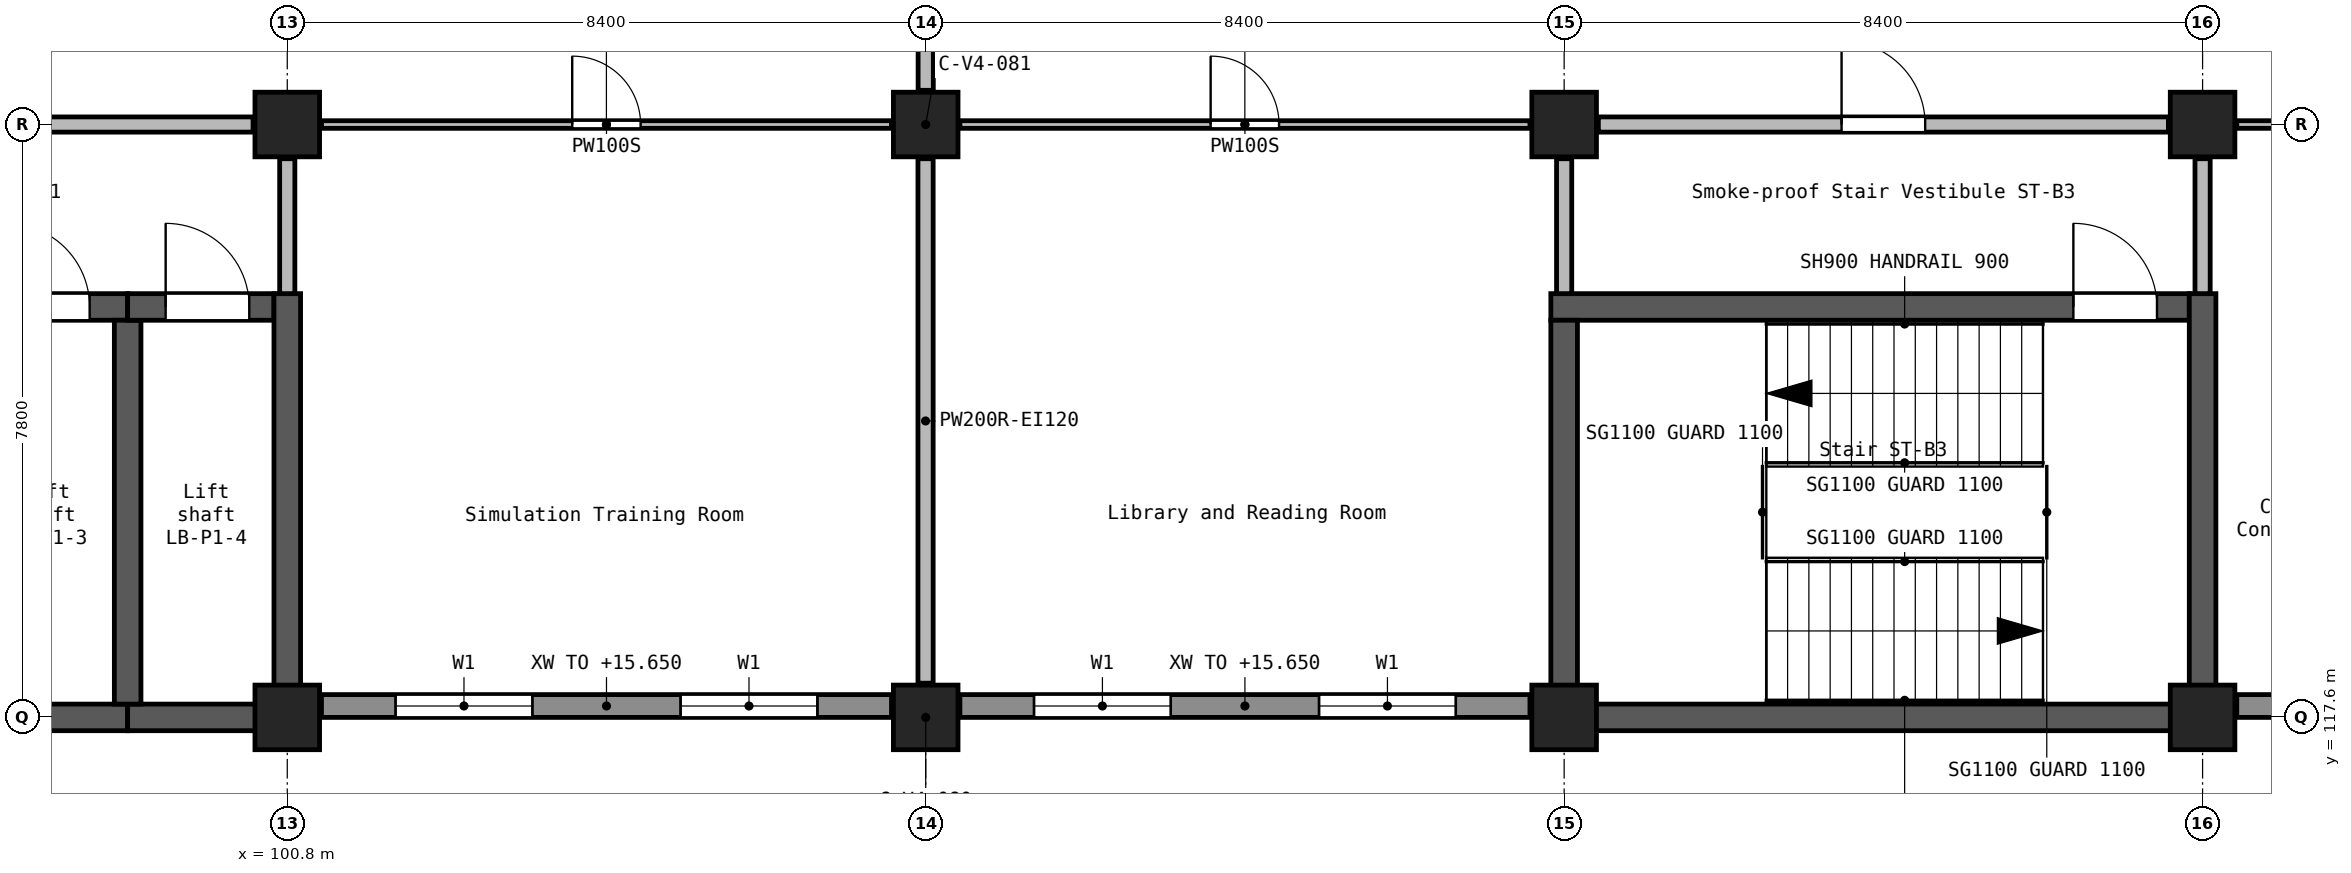
"""IFC4 building model, lengths in metres.
Left out: names, types, materials, properties, quantities, classifications, styles, units other than length and angle.
Written with IfcOpenShell. Run it as: python <this file> out.ifc"""

import sys

from ifc_helpers import new_model, si_unit, direction, frame, frame_2d, origin, origin_2d, place, context, subcontext, project, spatial, rectangle, extrude, element, fill, save


model = new_model("IFC4")
c1 = context("Model", 3, precision=1e-05, world=origin(), true_north=direction((0.0, 1.0)))
c2 = subcontext(c1, "Body", "Model", "MODEL_VIEW")
j1 = project(units=[si_unit("LENGTHUNIT", "METRE"), si_unit("PLANEANGLEUNIT", "RADIAN")], contexts=[c1])
p1 = place(None, origin())
s1 = spatial("IfcSite", under=j1, at=p1, CompositionType="ELEMENT")
p2 = place(p1, origin())
s2 = spatial("IfcBuilding", under=s1, at=p2, CompositionType="ELEMENT")
p3 = place(p2, frame((0.0, 0.0, 12.6)))
s3 = spatial("IfcBuildingStorey", under=s2, at=p3, CompositionType="ELEMENT", Elevation=12.6)
for number, where, z_axis, x_axis in (
    (1, (100.8, 117.6, 0.0), (0.0, 0.0, 1.0), (1.0, 0.0, 0.0)),
    (2, (100.8, 125.4, 0.0), (0.0, 0.0, 1.0), (1.0, 0.0, 0.0)),
    (3, (109.2, 117.6, 0.0), (0.0, 0.0, 1.0), (1.0, 0.0, 0.0)),
    (4, (109.2, 125.4, 0.0), (0.0, 0.0, 1.0), (1.0, 0.0, 0.0)),
    (5, (117.6, 117.6, 0.0), (0.0, 0.0, 1.0), (1.0, 0.0, 0.0)),
    (6, (117.6, 125.4, 0.0), (0.0, 0.0, 1.0), (1.0, 0.0, 0.0)),
    (7, (126.0, 117.6, 0.0), (0.0, 0.0, 1.0), (1.0, 0.0, 0.0)),
    (8, (126.0, 125.4, 0.0), (0.0, 0.0, 1.0), (1.0, 0.0, 0.0)),
):
    element("IfcColumn", number, at=place(p3, frame(where, z_axis=z_axis, x_axis=x_axis)), inside=s3, PredefinedType="COLUMN", context=c2, shape_type="SweptSolid", body=[
        extrude(rectangle(XDim=0.85, YDim=0.85, at=origin_2d()), origin(), (0.0, 0.0, 1.0), 4.2),
    ])
p4 = place(p3, frame((96.6, 117.6, 0.0), z_axis=(0.0, 0.0, 1.0), x_axis=(1.0, 0.0, 0.0)))
e9 = element("IfcWall", 9, at=p4, inside=s3, PredefinedType="SHEAR", context=c2, shape_type="SweptSolid", body=[
    extrude(rectangle(XDim=2.1, YDim=0.35, at=frame_2d((1.05, 0.0))), origin(), (0.0, 0.0, 1.0), 4.2),
])
p5 = place(p3, frame((96.6, 123.0, 0.0), z_axis=(0.0, 0.0, 1.0), x_axis=(1.0, 0.0, 0.0)))
e10 = element("IfcWall", 10, at=p5, inside=s3, PredefinedType="SHEAR", context=c2, shape_type="SweptSolid", body=[
    extrude(rectangle(XDim=2.1, YDim=0.35, at=frame_2d((1.05, 0.0))), origin(), (0.0, 0.0, 1.0), 4.2),
])
p6 = place(p5, frame((0.5, 0.0, 0.0)))
e11 = element("IfcOpeningElement", 11, at=p6, cuts=e10, PredefinedType="OPENING", context=c2, shape_type="SweptSolid", body=[
    extrude(rectangle(XDim=1.1, YDim=2.1, at=frame_2d((0.55, 1.05))), frame((0.0, 0.185, 0.0), z_axis=(0.0, -1.0, 0.0), x_axis=(1.0, 0.0, 0.0)), (0.0, 0.0, 1.0), 0.37),
])
p7 = place(p3, frame((98.7, 117.6, 0.0), z_axis=(0.0, 0.0, 1.0), x_axis=(1.0, 0.0, 0.0)))
e12 = element("IfcWall", 12, at=p7, inside=s3, PredefinedType="SHEAR", context=c2, shape_type="SweptSolid", body=[
    extrude(rectangle(XDim=1.925, YDim=0.35, at=frame_2d((0.962, 0.0))), origin(), (0.0, 0.0, 1.0), 4.2),
])
p8 = place(p3, frame((98.7, 117.775, 0.0), z_axis=(0.0, 0.0, 1.0), x_axis=(0.0, 1.0, 0.0)))
e13 = element("IfcWall", 13, at=p8, inside=s3, PredefinedType="SHEAR", context=c2, shape_type="SweptSolid", body=[
    extrude(rectangle(XDim=5.05, YDim=0.35, at=frame_2d((2.525, 0.0))), origin(), (0.0, 0.0, 1.0), 4.2),
])
p9 = place(p3, frame((98.7, 123.0, 0.0), z_axis=(0.0, 0.0, 1.0), x_axis=(1.0, 0.0, 0.0)))
e14 = element("IfcWall", 14, at=p9, inside=s3, PredefinedType="SHEAR", context=c2, shape_type="SweptSolid", body=[
    extrude(rectangle(XDim=1.925, YDim=0.35, at=frame_2d((0.962, 0.0))), origin(), (0.0, 0.0, 1.0), 4.2),
])
p10 = place(p9, frame((0.5, 0.0, 0.0)))
e15 = element("IfcOpeningElement", 15, at=p10, cuts=e14, PredefinedType="OPENING", context=c2, shape_type="SweptSolid", body=[
    extrude(rectangle(XDim=1.1, YDim=2.1, at=frame_2d((0.55, 1.05))), frame((0.0, 0.185, 0.0), z_axis=(0.0, -1.0, 0.0), x_axis=(1.0, 0.0, 0.0)), (0.0, 0.0, 1.0), 0.37),
])
p11 = place(p3, frame((100.8, 117.425, 0.0), z_axis=(0.0, 0.0, 1.0), x_axis=(0.0, 1.0, 0.0)))
e16 = element("IfcWall", 16, at=p11, inside=s3, PredefinedType="SHEAR", context=c2, shape_type="SweptSolid", body=[
    extrude(rectangle(XDim=5.75, YDim=0.35, at=frame_2d((2.875, 0.0))), origin(), (0.0, 0.0, 1.0), 4.2),
])
p12 = place(p3, frame((117.425, 123.0, 0.0), z_axis=(0.0, 0.0, 1.0), x_axis=(1.0, 0.0, 0.0)))
e17 = element("IfcWall", 17, at=p12, inside=s3, PredefinedType="SHEAR", context=c2, shape_type="SweptSolid", body=[
    extrude(rectangle(XDim=8.4, YDim=0.35, at=frame_2d((4.2, 0.0))), origin(), (0.0, 0.0, 1.0), 4.2),
])
p13 = place(p12, frame((6.875, 0.0, 0.0)))
e18 = element("IfcOpeningElement", 18, at=p13, cuts=e17, PredefinedType="OPENING", context=c2, shape_type="SweptSolid", body=[
    extrude(rectangle(XDim=1.1, YDim=2.1, at=frame_2d((0.55, 1.05))), frame((0.0, 0.185, 0.0), z_axis=(0.0, -1.0, 0.0), x_axis=(1.0, 0.0, 0.0)), (0.0, 0.0, 1.0), 0.37),
])
p14 = place(p3, frame((117.6, 117.425, 0.0), z_axis=(0.0, 0.0, 1.0), x_axis=(0.0, 1.0, 0.0)))
e19 = element("IfcWall", 19, at=p14, inside=s3, PredefinedType="SHEAR", context=c2, shape_type="SweptSolid", body=[
    extrude(rectangle(XDim=5.4, YDim=0.35, at=frame_2d((2.7, 0.0))), origin(), (0.0, 0.0, 1.0), 4.2),
])
p15 = place(p3, frame((117.775, 117.6, 0.0), z_axis=(0.0, 0.0, 1.0), x_axis=(1.0, 0.0, 0.0)))
e20 = element("IfcWall", 20, at=p15, inside=s3, PredefinedType="SHEAR", context=c2, shape_type="SweptSolid", body=[
    extrude(rectangle(XDim=8.05, YDim=0.35, at=frame_2d((4.025, 0.0))), origin(), (0.0, 0.0, 1.0), 4.2),
])
p16 = place(p3, frame((126.0, 117.425, 0.0), z_axis=(0.0, 0.0, 1.0), x_axis=(0.0, 1.0, 0.0)))
e21 = element("IfcWall", 21, at=p16, inside=s3, PredefinedType="SHEAR", context=c2, shape_type="SweptSolid", body=[
    extrude(rectangle(XDim=5.75, YDim=0.35, at=frame_2d((2.875, 0.0))), origin(), (0.0, 0.0, 1.0), 4.2),
])
p17 = place(p3, frame((101.25, 117.75, 0.0), z_axis=(0.0, 0.0, 1.0), x_axis=(1.0, 0.0, 0.0)))
e22 = element("IfcWall", 22, at=p17, inside=s3, PredefinedType="STANDARD", context=c2, shape_type="SweptSolid", body=[
    extrude(rectangle(XDim=7.5, YDim=0.3, at=frame_2d((3.75, 0.0))), origin(), (0.0, 0.0, 1.0), 3.05),
])
p18 = place(p17, frame((0.975, 0.0, 0.9)))
e23 = element("IfcOpeningElement", 23, at=p18, cuts=e22, PredefinedType="OPENING", context=c2, shape_type="SweptSolid", body=[
    extrude(rectangle(XDim=1.8, YDim=1.5, at=frame_2d((0.9, 0.75))), frame((0.0, 0.16, 0.0), z_axis=(0.0, -1.0, 0.0), x_axis=(1.0, 0.0, 0.0)), (0.0, 0.0, 1.0), 0.32),
])
p19 = place(p17, frame((4.725, 0.0, 0.9)))
e24 = element("IfcOpeningElement", 24, at=p19, cuts=e22, PredefinedType="OPENING", context=c2, shape_type="SweptSolid", body=[
    extrude(rectangle(XDim=1.8, YDim=1.5, at=frame_2d((0.9, 0.75))), frame((0.0, 0.16, 0.0), z_axis=(0.0, -1.0, 0.0), x_axis=(1.0, 0.0, 0.0)), (0.0, 0.0, 1.0), 0.32),
])
p20 = place(p3, frame((109.65, 117.75, 0.0), z_axis=(0.0, 0.0, 1.0), x_axis=(1.0, 0.0, 0.0)))
e25 = element("IfcWall", 25, at=p20, inside=s3, PredefinedType="STANDARD", context=c2, shape_type="SweptSolid", body=[
    extrude(rectangle(XDim=7.5, YDim=0.3, at=frame_2d((3.75, 0.0))), origin(), (0.0, 0.0, 1.0), 3.05),
])
p21 = place(p20, frame((0.975, 0.0, 0.9)))
e26 = element("IfcOpeningElement", 26, at=p21, cuts=e25, PredefinedType="OPENING", context=c2, shape_type="SweptSolid", body=[
    extrude(rectangle(XDim=1.8, YDim=1.5, at=frame_2d((0.9, 0.75))), frame((0.0, 0.16, 0.0), z_axis=(0.0, -1.0, 0.0), x_axis=(1.0, 0.0, 0.0)), (0.0, 0.0, 1.0), 0.32),
])
p22 = place(p20, frame((4.725, 0.0, 0.9)))
e27 = element("IfcOpeningElement", 27, at=p22, cuts=e25, PredefinedType="OPENING", context=c2, shape_type="SweptSolid", body=[
    extrude(rectangle(XDim=1.8, YDim=1.5, at=frame_2d((0.9, 0.75))), frame((0.0, 0.16, 0.0), z_axis=(0.0, -1.0, 0.0), x_axis=(1.0, 0.0, 0.0)), (0.0, 0.0, 1.0), 0.32),
])
p23 = place(p3, frame((126.45, 117.75, 0.0), z_axis=(0.0, 0.0, 1.0), x_axis=(1.0, 0.0, 0.0)))
e28 = element("IfcWall", 28, at=p23, inside=s3, PredefinedType="STANDARD", context=c2, shape_type="SweptSolid", body=[
    extrude(rectangle(XDim=7.5, YDim=0.3, at=frame_2d((3.75, 0.0))), origin(), (0.0, 0.0, 1.0), 3.05),
])
p24 = place(p23, frame((0.975, 0.0, 0.9)))
e29 = element("IfcOpeningElement", 29, at=p24, cuts=e28, PredefinedType="OPENING", context=c2, shape_type="SweptSolid", body=[
    extrude(rectangle(XDim=1.8, YDim=1.5, at=frame_2d((0.9, 0.75))), frame((0.0, 0.16, 0.0), z_axis=(0.0, -1.0, 0.0), x_axis=(1.0, 0.0, 0.0)), (0.0, 0.0, 1.0), 0.32),
])
p25 = place(p23, frame((4.725, 0.0, 0.9)))
e30 = element("IfcOpeningElement", 30, at=p25, cuts=e28, PredefinedType="OPENING", context=c2, shape_type="SweptSolid", body=[
    extrude(rectangle(XDim=1.8, YDim=1.5, at=frame_2d((0.9, 0.75))), frame((0.0, 0.16, 0.0), z_axis=(0.0, -1.0, 0.0), x_axis=(1.0, 0.0, 0.0)), (0.0, 0.0, 1.0), 0.32),
])
p26 = place(p3, frame((118.05, 125.4, 0.0), z_axis=(0.0, 0.0, 1.0), x_axis=(1.0, 0.0, 0.0)))
e31 = element("IfcWall", 31, at=p26, inside=s3, PredefinedType="SOLIDWALL", context=c2, shape_type="SweptSolid", body=[
    extrude(rectangle(XDim=7.5, YDim=0.2, at=frame_2d((3.75, 0.0))), origin(), (0.0, 0.0, 1.0), 3.85),
])
p27 = place(p26, frame((3.2, 0.0, 0.0)))
e32 = element("IfcOpeningElement", 32, at=p27, cuts=e31, PredefinedType="OPENING", context=c2, shape_type="SweptSolid", body=[
    extrude(rectangle(XDim=1.1, YDim=2.1, at=frame_2d((0.55, 1.05))), frame((0.0, 0.11, 0.0), z_axis=(0.0, -1.0, 0.0), x_axis=(1.0, 0.0, 0.0)), (0.0, 0.0, 1.0), 0.22),
])
p28 = place(p3, frame((92.85, 125.4, 0.0), z_axis=(0.0, 0.0, 1.0), x_axis=(1.0, 0.0, 0.0)))
e33 = element("IfcWall", 33, at=p28, inside=s3, PredefinedType="SOLIDWALL", context=c2, shape_type="SweptSolid", body=[
    extrude(rectangle(XDim=7.5, YDim=0.2, at=frame_2d((3.75, 0.0))), origin(), (0.0, 0.0, 1.0), 3.85),
])
p29 = place(p28, frame((2.85, 0.0, 0.0)))
e34 = element("IfcOpeningElement", 34, at=p29, cuts=e33, PredefinedType="OPENING", context=c2, shape_type="SweptSolid", body=[
    extrude(rectangle(XDim=1.8, YDim=2.1, at=frame_2d((0.9, 1.05))), frame((0.0, 0.11, 0.0), z_axis=(0.0, -1.0, 0.0), x_axis=(1.0, 0.0, 0.0)), (0.0, 0.0, 1.0), 0.22),
])
p30 = place(p3, frame((109.198, 118.05, 0.0), z_axis=(0.0, 0.0, 1.0), x_axis=(0.0, 1.0, 0.0)))
e35 = element("IfcWall", 35, at=p30, inside=s3, PredefinedType="SOLIDWALL", context=c2, shape_type="SweptSolid", body=[
    extrude(rectangle(XDim=6.9, YDim=0.2, at=frame_2d((3.45, 0.0))), origin(), (0.0, 0.0, 1.0), 3.85),
])
p31 = place(p3, frame((109.2, 125.85, 0.0), z_axis=(0.0, 0.0, 1.0), x_axis=(0.0, 1.0, 0.0)))
e36 = element("IfcWall", 36, at=p31, inside=s3, PredefinedType="SOLIDWALL", context=c2, shape_type="SweptSolid", body=[
    extrude(rectangle(XDim=2.7, YDim=0.2, at=frame_2d((1.35, 0.0))), origin(), (0.0, 0.0, 1.0), 3.85),
])
for number, where, z_axis, x_axis in (
    (37, (100.8, 123.175, 0.0), (0.0, 0.0, 1.0), (0.0, 1.0, 0.0)),
    (38, (117.6, 123.175, 0.0), (0.0, 0.0, 1.0), (0.0, 1.0, 0.0)),
    (39, (126.0, 123.175, 0.0), (0.0, 0.0, 1.0), (0.0, 1.0, 0.0)),
):
    element("IfcWall", number, at=place(p3, frame(where, z_axis=z_axis, x_axis=x_axis)), inside=s3, PredefinedType="SOLIDWALL", context=c2, shape_type="SweptSolid", body=[
        extrude(rectangle(XDim=1.775, YDim=0.2, at=frame_2d((0.887, 0.0))), origin(), (0.0, 0.0, 1.0), 3.85),
    ])
p32 = place(p3, frame((109.65, 125.4, 0.0), z_axis=(0.0, 0.0, 1.0), x_axis=(1.0, 0.0, 0.0)))
e40 = element("IfcWall", 40, at=p32, inside=s3, PredefinedType="PARTITIONING", context=c2, shape_type="SweptSolid", body=[
    extrude(rectangle(XDim=7.5, YDim=0.1, at=frame_2d((3.75, 0.0))), origin(), (0.0, 0.0, 1.0), 3.85),
])
p33 = place(p32, frame((3.299, 0.0, 0.0)))
e41 = element("IfcOpeningElement", 41, at=p33, cuts=e40, PredefinedType="OPENING", context=c2, shape_type="SweptSolid", body=[
    extrude(rectangle(XDim=0.9, YDim=2.1, at=frame_2d((0.45, 1.05))), frame((0.0, 0.06, 0.0), z_axis=(0.0, -1.0, 0.0), x_axis=(1.0, 0.0, 0.0)), (0.0, 0.0, 1.0), 0.12),
])
p34 = place(p3, frame((101.25, 125.4, 0.0), z_axis=(0.0, 0.0, 1.0), x_axis=(1.0, 0.0, 0.0)))
e42 = element("IfcWall", 42, at=p34, inside=s3, PredefinedType="PARTITIONING", context=c2, shape_type="SweptSolid", body=[
    extrude(rectangle(XDim=7.5, YDim=0.1, at=frame_2d((3.75, 0.0))), origin(), (0.0, 0.0, 1.0), 3.85),
])
p35 = place(p34, frame((3.299, 0.0, 0.0)))
e43 = element("IfcOpeningElement", 43, at=p35, cuts=e42, PredefinedType="OPENING", context=c2, shape_type="SweptSolid", body=[
    extrude(rectangle(XDim=0.9, YDim=2.1, at=frame_2d((0.45, 1.05))), frame((0.0, 0.06, 0.0), z_axis=(0.0, -1.0, 0.0), x_axis=(1.0, 0.0, 0.0)), (0.0, 0.0, 1.0), 0.12),
])
p36 = place(p3, frame((126.45, 125.4, 0.0), z_axis=(0.0, 0.0, 1.0), x_axis=(1.0, 0.0, 0.0)))
e44 = element("IfcWall", 44, at=p36, inside=s3, PredefinedType="PARTITIONING", context=c2, shape_type="SweptSolid", body=[
    extrude(rectangle(XDim=3.05, YDim=0.1, at=frame_2d((1.525, 0.0))), origin(), (0.0, 0.0, 1.0), 3.85),
])
p37 = place(p36, frame((0.9, 0.0, 0.0)))
e45 = element("IfcOpeningElement", 45, at=p37, cuts=e44, PredefinedType="OPENING", context=c2, shape_type="SweptSolid", body=[
    extrude(rectangle(XDim=0.9, YDim=2.1, at=frame_2d((0.45, 1.05))), frame((0.0, 0.06, 0.0), z_axis=(0.0, -1.0, 0.0), x_axis=(1.0, 0.0, 0.0)), (0.0, 0.0, 1.0), 0.12),
])
p38 = place(p18, origin())
e46 = element("IfcWindow", 46, at=p38, inside=s3, PartitioningType="SINGLE_PANEL", PredefinedType="WINDOW", context=c2, shape_type="SweptSolid", body=[
    extrude(rectangle(XDim=1.8, YDim=1.5, at=frame_2d((0.9, 0.75))), frame((0.0, 0.03, 0.0), z_axis=(0.0, -1.0, 0.0), x_axis=(1.0, 0.0, 0.0)), (0.0, 0.0, 1.0), 0.06),
])
fill(e23, e46)
p39 = place(p19, origin())
e47 = element("IfcWindow", 47, at=p39, inside=s3, PartitioningType="SINGLE_PANEL", PredefinedType="WINDOW", context=c2, shape_type="SweptSolid", body=[
    extrude(rectangle(XDim=1.8, YDim=1.5, at=frame_2d((0.9, 0.75))), frame((0.0, 0.03, 0.0), z_axis=(0.0, -1.0, 0.0), x_axis=(1.0, 0.0, 0.0)), (0.0, 0.0, 1.0), 0.06),
])
fill(e24, e47)
p40 = place(p21, origin())
e48 = element("IfcWindow", 48, at=p40, inside=s3, PartitioningType="SINGLE_PANEL", PredefinedType="WINDOW", context=c2, shape_type="SweptSolid", body=[
    extrude(rectangle(XDim=1.8, YDim=1.5, at=frame_2d((0.9, 0.75))), frame((0.0, 0.03, 0.0), z_axis=(0.0, -1.0, 0.0), x_axis=(1.0, 0.0, 0.0)), (0.0, 0.0, 1.0), 0.06),
])
fill(e26, e48)
p41 = place(p22, origin())
e49 = element("IfcWindow", 49, at=p41, inside=s3, PartitioningType="SINGLE_PANEL", PredefinedType="WINDOW", context=c2, shape_type="SweptSolid", body=[
    extrude(rectangle(XDim=1.8, YDim=1.5, at=frame_2d((0.9, 0.75))), frame((0.0, 0.03, 0.0), z_axis=(0.0, -1.0, 0.0), x_axis=(1.0, 0.0, 0.0)), (0.0, 0.0, 1.0), 0.06),
])
fill(e27, e49)
p42 = place(p6, origin())
e50 = element("IfcDoor", 50, at=p42, inside=s3, OperationType="DOUBLE_DOOR_SLIDING", PredefinedType="DOOR", context=c2, shape_type="SweptSolid", body=[
    extrude(rectangle(XDim=1.1, YDim=2.1, at=frame_2d((0.55, 1.05))), frame((0.0, 0.025, 0.0), z_axis=(0.0, -1.0, 0.0), x_axis=(1.0, 0.0, 0.0)), (0.0, 0.0, 1.0), 0.05),
])
fill(e11, e50)
p43 = place(p10, origin())
e51 = element("IfcDoor", 51, at=p43, inside=s3, OperationType="DOUBLE_DOOR_SLIDING", PredefinedType="DOOR", context=c2, shape_type="SweptSolid", body=[
    extrude(rectangle(XDim=1.1, YDim=2.1, at=frame_2d((0.55, 1.05))), frame((0.0, 0.025, 0.0), z_axis=(0.0, -1.0, 0.0), x_axis=(1.0, 0.0, 0.0)), (0.0, 0.0, 1.0), 0.05),
])
fill(e15, e51)
p44 = place(p13, frame((1.1, 0.0, 0.0), z_axis=(0.0, 0.0, 1.0), x_axis=(-1.0, 0.0, 0.0)))
e52 = element("IfcDoor", 52, at=p44, inside=s3, OperationType="SINGLE_SWING_LEFT", PredefinedType="DOOR", context=c2, shape_type="SweptSolid", body=[
    extrude(rectangle(XDim=1.1, YDim=2.1, at=frame_2d((0.55, 1.05))), frame((0.0, 0.025, 0.0), z_axis=(0.0, -1.0, 0.0), x_axis=(1.0, 0.0, 0.0)), (0.0, 0.0, 1.0), 0.05),
])
fill(e18, e52)
p45 = place(p27, frame((1.1, 0.0, 0.0), z_axis=(0.0, 0.0, 1.0), x_axis=(-1.0, 0.0, 0.0)))
e53 = element("IfcDoor", 53, at=p45, inside=s3, OperationType="SINGLE_SWING_LEFT", PredefinedType="DOOR", context=c2, shape_type="SweptSolid", body=[
    extrude(rectangle(XDim=1.1, YDim=2.1, at=frame_2d((0.55, 1.05))), frame((0.0, 0.025, 0.0), z_axis=(0.0, -1.0, 0.0), x_axis=(1.0, 0.0, 0.0)), (0.0, 0.0, 1.0), 0.05),
])
fill(e32, e53)
p46 = place(p35, frame((0.9, 0.0, 0.0), z_axis=(0.0, 0.0, 1.0), x_axis=(-1.0, 0.0, 0.0)))
e54 = element("IfcDoor", 54, at=p46, inside=s3, OperationType="SINGLE_SWING_RIGHT", PredefinedType="DOOR", context=c2, shape_type="SweptSolid", body=[
    extrude(rectangle(XDim=0.9, YDim=2.1, at=frame_2d((0.45, 1.05))), frame((0.0, 0.025, 0.0), z_axis=(0.0, -1.0, 0.0), x_axis=(1.0, 0.0, 0.0)), (0.0, 0.0, 1.0), 0.05),
])
fill(e43, e54)
p47 = place(p33, frame((0.9, 0.0, 0.0), z_axis=(0.0, 0.0, 1.0), x_axis=(-1.0, 0.0, 0.0)))
e55 = element("IfcDoor", 55, at=p47, inside=s3, OperationType="SINGLE_SWING_RIGHT", PredefinedType="DOOR", context=c2, shape_type="SweptSolid", body=[
    extrude(rectangle(XDim=0.9, YDim=2.1, at=frame_2d((0.45, 1.05))), frame((0.0, 0.025, 0.0), z_axis=(0.0, -1.0, 0.0), x_axis=(1.0, 0.0, 0.0)), (0.0, 0.0, 1.0), 0.05),
])
fill(e41, e55)
save(model, sys.argv[1])
